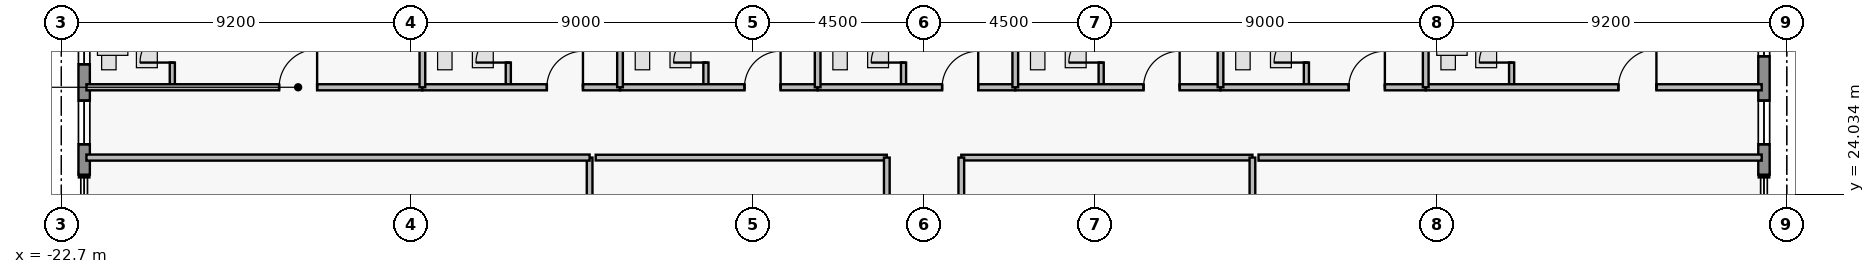
"""IFC4 building model, lengths in metres.
Left out: names, types, materials, properties, quantities, classifications, styles, units other than length and angle.
Written with IfcOpenShell. Run it as: python <this file> out.ifc"""

import sys

from ifc_helpers import new_model, si_unit, direction, frame, frame_2d, origin, place, context, subcontext, project, spatial, rectangle, extrude, element, fill, save


model = new_model("IFC4")
c1 = context("Model", 3, precision=1e-05, world=origin(), true_north=direction((0.0, 1.0)))
c2 = subcontext(c1, "Body", "Model", "MODEL_VIEW")
j1 = project(units=[si_unit("LENGTHUNIT", "METRE"), si_unit("PLANEANGLEUNIT", "RADIAN")], contexts=[c1])
p1 = place(None, origin())
s1 = spatial("IfcSite", under=j1, at=p1, CompositionType="ELEMENT")
p2 = place(p1, origin())
s2 = spatial("IfcBuilding", under=s1, at=p2, CompositionType="ELEMENT")
p3 = place(p2, frame((0.0, 0.0, 203.65)))
s3 = spatial("IfcBuildingStorey", under=s2, at=p3, CompositionType="ELEMENT", Elevation=203.65)
p4 = place(p3, frame((-22.1, 24.55, 0.0), z_axis=(0.0, 0.0, 1.0), x_axis=(0.0, 1.0, 0.0)))
e1 = element("IfcWall", 1, at=p4, inside=s3, PredefinedType="STANDARD", context=c2, shape_type="SweptSolid", body=[
    extrude(rectangle(XDim=5.65, YDim=0.3, at=frame_2d((2.825, 0.0))), origin(), (0.0, 0.0, 1.0), 3.53),
])
p5 = place(p4, frame((0.8, 0.0, 0.95)))
e2 = element("IfcOpeningElement", 2, at=p5, cuts=e1, PredefinedType="OPENING", context=c2, shape_type="SweptSolid", body=[
    extrude(rectangle(XDim=1.15, YDim=1.55, at=frame_2d((0.575, 0.775))), frame((0.0, 0.16, 0.0), z_axis=(0.0, -1.0, 0.0), x_axis=(1.0, 0.0, 0.0)), (0.0, 0.0, 1.0), 0.32),
])
p6 = place(p4, frame((2.905, 0.0, 0.95)))
e3 = element("IfcOpeningElement", 3, at=p6, cuts=e1, PredefinedType="OPENING", context=c2, shape_type="SweptSolid", body=[
    extrude(rectangle(XDim=1.15, YDim=1.55, at=frame_2d((0.575, 0.775))), frame((0.0, 0.16, 0.0), z_axis=(0.0, -1.0, 0.0), x_axis=(1.0, 0.0, 0.0)), (0.0, 0.0, 1.0), 0.32),
])
p7 = place(p3, frame((22.1, 30.2, 0.0), z_axis=(0.0, 0.0, 1.0), x_axis=(0.0, -1.0, 0.0)))
e4 = element("IfcWall", 4, at=p7, inside=s3, PredefinedType="STANDARD", context=c2, shape_type="SweptSolid", body=[
    extrude(rectangle(XDim=5.65, YDim=0.3, at=frame_2d((2.825, 0.0))), origin(), (0.0, 0.0, 1.0), 3.53),
])
p8 = place(p7, frame((0.935, 0.0, 0.85)))
e5 = element("IfcOpeningElement", 5, at=p8, cuts=e4, PredefinedType="OPENING", context=c2, shape_type="SweptSolid", body=[
    extrude(rectangle(XDim=1.6, YDim=1.8, at=frame_2d((0.8, 0.9))), frame((0.0, 0.16, 0.0), z_axis=(0.0, -1.0, 0.0), x_axis=(1.0, 0.0, 0.0)), (0.0, 0.0, 1.0), 0.32),
])
p9 = place(p7, frame((3.7, 0.0, 0.95)))
e6 = element("IfcOpeningElement", 6, at=p9, cuts=e4, PredefinedType="OPENING", context=c2, shape_type="SweptSolid", body=[
    extrude(rectangle(XDim=1.15, YDim=1.55, at=frame_2d((0.575, 0.775))), frame((0.0, 0.16, 0.0), z_axis=(0.0, -1.0, 0.0), x_axis=(1.0, 0.0, 0.0)), (0.0, 0.0, 1.0), 0.32),
])
p10 = place(p3, frame((-19.78, 26.85, 0.0), z_axis=(0.0, 0.0, 1.0), x_axis=(0.0, 1.0, 0.0)))
e7 = element("IfcWall", 7, at=p10, inside=s3, PredefinedType="PLUMBINGWALL", context=c2, shape_type="SweptSolid", body=[
    extrude(rectangle(XDim=2.36, YDim=0.135, at=frame_2d((1.18, 0.0))), origin(), (0.0, 0.0, 1.0), 3.53),
])
p11 = place(p10, frame((0.65, 0.0, 0.0)))
e8 = element("IfcOpeningElement", 8, at=p11, cuts=e7, PredefinedType="OPENING", context=c2, shape_type="SweptSolid", body=[
    extrude(rectangle(XDim=0.85, YDim=2.1, at=frame_2d((0.425, 1.05))), frame((0.0, 0.077, 0.0), z_axis=(0.0, -1.0, 0.0), x_axis=(1.0, 0.0, 0.0)), (0.0, 0.0, 1.0), 0.155),
])
p12 = place(p3, frame((-22.04, 26.85, 0.0), z_axis=(0.0, 0.0, 1.0), x_axis=(1.0, 0.0, 0.0)))
e9 = element("IfcWall", 9, at=p12, inside=s3, PredefinedType="PARTITIONING", context=c2, shape_type="SweptSolid", body=[
    extrude(rectangle(XDim=8.84, YDim=0.16, at=frame_2d((4.42, 0.0))), origin(), (0.0, 0.0, 1.0), 3.53),
])
p13 = place(p12, frame((5.07, 0.0, 0.0)))
e10 = element("IfcOpeningElement", 10, at=p13, cuts=e9, PredefinedType="OPENING", context=c2, shape_type="SweptSolid", body=[
    extrude(rectangle(XDim=1.0, YDim=2.15, at=frame_2d((0.5, 1.075))), frame((0.0, 0.09, 0.0), z_axis=(0.0, -1.0, 0.0), x_axis=(1.0, 0.0, 0.0)), (0.0, 0.0, 1.0), 0.18),
])
p14 = place(p3, frame((-10.94, 26.85, 0.0), z_axis=(0.0, 0.0, 1.0), x_axis=(0.0, 1.0, 0.0)))
e11 = element("IfcWall", 11, at=p14, inside=s3, PredefinedType="PLUMBINGWALL", context=c2, shape_type="SweptSolid", body=[
    extrude(rectangle(XDim=2.36, YDim=0.135, at=frame_2d((1.18, 0.0))), origin(), (0.0, 0.0, 1.0), 3.53),
])
p15 = place(p14, frame((0.65, 0.0, 0.0)))
e12 = element("IfcOpeningElement", 12, at=p15, cuts=e11, PredefinedType="OPENING", context=c2, shape_type="SweptSolid", body=[
    extrude(rectangle(XDim=0.85, YDim=2.1, at=frame_2d((0.425, 1.05))), frame((0.0, 0.077, 0.0), z_axis=(0.0, -1.0, 0.0), x_axis=(1.0, 0.0, 0.0)), (0.0, 0.0, 1.0), 0.155),
])
p16 = place(p3, frame((-13.2, 26.85, 0.0), z_axis=(0.0, 0.0, 1.0), x_axis=(1.0, 0.0, 0.0)))
e13 = element("IfcWall", 13, at=p16, inside=s3, PredefinedType="PARTITIONING", context=c2, shape_type="SweptSolid", body=[
    extrude(rectangle(XDim=5.2, YDim=0.16, at=frame_2d((2.6, 0.0))), origin(), (0.0, 0.0, 1.0), 3.53),
])
p17 = place(p16, frame((3.275, 0.0, 0.0)))
e14 = element("IfcOpeningElement", 14, at=p17, cuts=e13, PredefinedType="OPENING", context=c2, shape_type="SweptSolid", body=[
    extrude(rectangle(XDim=0.95, YDim=2.15, at=frame_2d((0.475, 1.075))), frame((0.0, 0.09, 0.0), z_axis=(0.0, -1.0, 0.0), x_axis=(1.0, 0.0, 0.0)), (0.0, 0.0, 1.0), 0.18),
])
p18 = place(p3, frame((-5.74, 26.85, 0.0), z_axis=(0.0, 0.0, 1.0), x_axis=(0.0, 1.0, 0.0)))
e15 = element("IfcWall", 15, at=p18, inside=s3, PredefinedType="PLUMBINGWALL", context=c2, shape_type="SweptSolid", body=[
    extrude(rectangle(XDim=2.36, YDim=0.135, at=frame_2d((1.18, 0.0))), origin(), (0.0, 0.0, 1.0), 3.53),
])
p19 = place(p18, frame((0.65, 0.0, 0.0)))
e16 = element("IfcOpeningElement", 16, at=p19, cuts=e15, PredefinedType="OPENING", context=c2, shape_type="SweptSolid", body=[
    extrude(rectangle(XDim=0.85, YDim=2.1, at=frame_2d((0.425, 1.05))), frame((0.0, 0.077, 0.0), z_axis=(0.0, -1.0, 0.0), x_axis=(1.0, 0.0, 0.0)), (0.0, 0.0, 1.0), 0.155),
])
p20 = place(p3, frame((-8.0, 26.85, 0.0), z_axis=(0.0, 0.0, 1.0), x_axis=(1.0, 0.0, 0.0)))
e17 = element("IfcWall", 17, at=p20, inside=s3, PredefinedType="PARTITIONING", context=c2, shape_type="SweptSolid", body=[
    extrude(rectangle(XDim=5.2, YDim=0.16, at=frame_2d((2.6, 0.0))), origin(), (0.0, 0.0, 1.0), 3.53),
])
p21 = place(p20, frame((3.275, 0.0, 0.0)))
e18 = element("IfcOpeningElement", 18, at=p21, cuts=e17, PredefinedType="OPENING", context=c2, shape_type="SweptSolid", body=[
    extrude(rectangle(XDim=0.95, YDim=2.15, at=frame_2d((0.475, 1.075))), frame((0.0, 0.09, 0.0), z_axis=(0.0, -1.0, 0.0), x_axis=(1.0, 0.0, 0.0)), (0.0, 0.0, 1.0), 0.18),
])
p22 = place(p3, frame((-0.54, 26.85, 0.0), z_axis=(0.0, 0.0, 1.0), x_axis=(0.0, 1.0, 0.0)))
e19 = element("IfcWall", 19, at=p22, inside=s3, PredefinedType="PLUMBINGWALL", context=c2, shape_type="SweptSolid", body=[
    extrude(rectangle(XDim=2.36, YDim=0.135, at=frame_2d((1.18, 0.0))), origin(), (0.0, 0.0, 1.0), 3.53),
])
p23 = place(p22, frame((0.65, 0.0, 0.0)))
e20 = element("IfcOpeningElement", 20, at=p23, cuts=e19, PredefinedType="OPENING", context=c2, shape_type="SweptSolid", body=[
    extrude(rectangle(XDim=0.85, YDim=2.1, at=frame_2d((0.425, 1.05))), frame((0.0, 0.077, 0.0), z_axis=(0.0, -1.0, 0.0), x_axis=(1.0, 0.0, 0.0)), (0.0, 0.0, 1.0), 0.155),
])
p24 = place(p3, frame((-2.8, 26.85, 0.0), z_axis=(0.0, 0.0, 1.0), x_axis=(1.0, 0.0, 0.0)))
e21 = element("IfcWall", 21, at=p24, inside=s3, PredefinedType="PARTITIONING", context=c2, shape_type="SweptSolid", body=[
    extrude(rectangle(XDim=5.2, YDim=0.16, at=frame_2d((2.6, 0.0))), origin(), (0.0, 0.0, 1.0), 3.53),
])
p25 = place(p24, frame((3.275, 0.0, 0.0)))
e22 = element("IfcOpeningElement", 22, at=p25, cuts=e21, PredefinedType="OPENING", context=c2, shape_type="SweptSolid", body=[
    extrude(rectangle(XDim=0.95, YDim=2.15, at=frame_2d((0.475, 1.075))), frame((0.0, 0.09, 0.0), z_axis=(0.0, -1.0, 0.0), x_axis=(1.0, 0.0, 0.0)), (0.0, 0.0, 1.0), 0.18),
])
p26 = place(p3, frame((4.66, 26.85, 0.0), z_axis=(0.0, 0.0, 1.0), x_axis=(0.0, 1.0, 0.0)))
e23 = element("IfcWall", 23, at=p26, inside=s3, PredefinedType="PLUMBINGWALL", context=c2, shape_type="SweptSolid", body=[
    extrude(rectangle(XDim=2.36, YDim=0.135, at=frame_2d((1.18, 0.0))), origin(), (0.0, 0.0, 1.0), 2.519),
])
p27 = place(p26, frame((0.65, 0.0, 0.0)))
e24 = element("IfcOpeningElement", 24, at=p27, cuts=e23, PredefinedType="OPENING", context=c2, shape_type="SweptSolid", body=[
    extrude(rectangle(XDim=0.85, YDim=2.1, at=frame_2d((0.425, 1.05))), frame((0.0, 0.077, 0.0), z_axis=(0.0, -1.0, 0.0), x_axis=(1.0, 0.0, 0.0)), (0.0, 0.0, 1.0), 0.155),
])
p28 = place(p3, frame((2.4, 26.85, 0.0), z_axis=(0.0, 0.0, 1.0), x_axis=(1.0, 0.0, 0.0)))
e25 = element("IfcWall", 25, at=p28, inside=s3, PredefinedType="PARTITIONING", context=c2, shape_type="SweptSolid", body=[
    extrude(rectangle(XDim=5.4, YDim=0.16, at=frame_2d((2.7, 0.0))), origin(), (0.0, 0.0, 1.0), 3.53),
])
p29 = place(p28, frame((3.375, 0.0, 0.0)))
e26 = element("IfcOpeningElement", 26, at=p29, cuts=e25, PredefinedType="OPENING", context=c2, shape_type="SweptSolid", body=[
    extrude(rectangle(XDim=0.95, YDim=2.15, at=frame_2d((0.475, 1.075))), frame((0.0, 0.09, 0.0), z_axis=(0.0, -1.0, 0.0), x_axis=(1.0, 0.0, 0.0)), (0.0, 0.0, 1.0), 0.18),
])
p30 = place(p3, frame((10.06, 26.85, 0.0), z_axis=(0.0, 0.0, 1.0), x_axis=(0.0, 1.0, 0.0)))
e27 = element("IfcWall", 27, at=p30, inside=s3, PredefinedType="PLUMBINGWALL", context=c2, shape_type="SweptSolid", body=[
    extrude(rectangle(XDim=2.36, YDim=0.135, at=frame_2d((1.18, 0.0))), origin(), (0.0, 0.0, 1.0), 3.53),
])
p31 = place(p30, frame((0.65, 0.0, 0.0)))
e28 = element("IfcOpeningElement", 28, at=p31, cuts=e27, PredefinedType="OPENING", context=c2, shape_type="SweptSolid", body=[
    extrude(rectangle(XDim=0.85, YDim=2.1, at=frame_2d((0.425, 1.05))), frame((0.0, 0.077, 0.0), z_axis=(0.0, -1.0, 0.0), x_axis=(1.0, 0.0, 0.0)), (0.0, 0.0, 1.0), 0.155),
])
p32 = place(p3, frame((7.8, 26.85, 0.0), z_axis=(0.0, 0.0, 1.0), x_axis=(1.0, 0.0, 0.0)))
e29 = element("IfcWall", 29, at=p32, inside=s3, PredefinedType="PARTITIONING", context=c2, shape_type="SweptSolid", body=[
    extrude(rectangle(XDim=5.4, YDim=0.16, at=frame_2d((2.7, 0.0))), origin(), (0.0, 0.0, 1.0), 3.53),
])
p33 = place(p32, frame((3.375, 0.0, 0.0)))
e30 = element("IfcOpeningElement", 30, at=p33, cuts=e29, PredefinedType="OPENING", context=c2, shape_type="SweptSolid", body=[
    extrude(rectangle(XDim=0.95, YDim=2.15, at=frame_2d((0.475, 1.075))), frame((0.0, 0.09, 0.0), z_axis=(0.0, -1.0, 0.0), x_axis=(1.0, 0.0, 0.0)), (0.0, 0.0, 1.0), 0.18),
])
p34 = place(p3, frame((15.46, 26.85, 0.0), z_axis=(0.0, 0.0, 1.0), x_axis=(0.0, 1.0, 0.0)))
e31 = element("IfcWall", 31, at=p34, inside=s3, PredefinedType="PLUMBINGWALL", context=c2, shape_type="SweptSolid", body=[
    extrude(rectangle(XDim=2.36, YDim=0.135, at=frame_2d((1.18, 0.0))), origin(), (0.0, 0.0, 1.0), 3.53),
])
p35 = place(p34, frame((0.65, 0.0, 0.0)))
e32 = element("IfcOpeningElement", 32, at=p35, cuts=e31, PredefinedType="OPENING", context=c2, shape_type="SweptSolid", body=[
    extrude(rectangle(XDim=0.85, YDim=2.1, at=frame_2d((0.425, 1.05))), frame((0.0, 0.077, 0.0), z_axis=(0.0, -1.0, 0.0), x_axis=(1.0, 0.0, 0.0)), (0.0, 0.0, 1.0), 0.155),
])
p36 = place(p3, frame((13.2, 26.85, 0.0), z_axis=(0.0, 0.0, 1.0), x_axis=(1.0, 0.0, 0.0)))
e33 = element("IfcWall", 33, at=p36, inside=s3, PredefinedType="PARTITIONING", context=c2, shape_type="SweptSolid", body=[
    extrude(rectangle(XDim=8.84, YDim=0.16, at=frame_2d((4.42, 0.0))), origin(), (0.0, 0.0, 1.0), 3.53),
])
p37 = place(p36, frame((5.07, 0.0, 0.0)))
e34 = element("IfcOpeningElement", 34, at=p37, cuts=e33, PredefinedType="OPENING", context=c2, shape_type="SweptSolid", body=[
    extrude(rectangle(XDim=1.0, YDim=2.15, at=frame_2d((0.5, 1.075))), frame((0.0, 0.09, 0.0), z_axis=(0.0, -1.0, 0.0), x_axis=(1.0, 0.0, 0.0)), (0.0, 0.0, 1.0), 0.18),
])
for number, where, z_axis, x_axis in (
    (35, (-13.2, 26.85, 0.0), (0.0, 0.0, 1.0), (0.0, 1.0, 0.0)),
    (36, (-8.0, 26.85, 0.0), (0.0, 0.0, 1.0), (0.0, 1.0, 0.0)),
    (37, (-2.8, 26.85, 0.0), (0.0, 0.0, 1.0), (0.0, 1.0, 0.0)),
    (38, (2.4, 26.85, 0.0), (0.0, 0.0, 1.0), (0.0, 1.0, 0.0)),
    (39, (7.8, 26.85, 0.0), (0.0, 0.0, 1.0), (0.0, 1.0, 0.0)),
    (40, (13.2, 26.85, 0.0), (0.0, 0.0, 1.0), (0.0, 1.0, 0.0)),
):
    element("IfcWall", number, at=place(p3, frame(where, z_axis=z_axis, x_axis=x_axis)), inside=s3, PredefinedType="PARTITIONING", context=c2, shape_type="SweptSolid", body=[
        extrude(rectangle(XDim=6.67, YDim=0.15, at=frame_2d((3.335, 0.0))), origin(), (0.0, 0.0, 1.0), 3.53),
    ])
p38 = place(p3, frame((-8.8, 16.7, 0.0), z_axis=(0.0, 0.0, 1.0), x_axis=(0.0, 1.0, 0.0)))
e41 = element("IfcWall", 41, at=p38, inside=s3, PredefinedType="PARTITIONING", context=c2, shape_type="SweptSolid", body=[
    extrude(rectangle(XDim=8.3, YDim=0.15, at=frame_2d((4.15, 0.0))), origin(), (0.0, 0.0, 1.0), 3.53),
])
p39 = place(p3, frame((-22.04, 25.0, 0.0), z_axis=(0.0, 0.0, 1.0), x_axis=(1.0, 0.0, 0.0)))
e42 = element("IfcWall", 42, at=p39, inside=s3, PredefinedType="PARTITIONING", context=c2, shape_type="SweptSolid", body=[
    extrude(rectangle(XDim=13.24, YDim=0.16, at=frame_2d((6.62, 0.0))), origin(), (0.0, 0.0, 1.0), 3.124),
])
p40 = place(p3, frame((-8.64, 25.0, 0.0), z_axis=(0.0, 0.0, 1.0), x_axis=(1.0, 0.0, 0.0)))
e43 = element("IfcWall", 43, at=p40, inside=s3, PredefinedType="PARTITIONING", context=c2, shape_type="SweptSolid", body=[
    extrude(rectangle(XDim=7.66, YDim=0.15, at=frame_2d((3.83, 0.0))), origin(), (0.0, 0.0, 1.0), 3.124),
])
p41 = place(p3, frame((-0.98, 16.7, 0.0), z_axis=(0.0, 0.0, 1.0), x_axis=(0.0, 1.0, 0.0)))
e44 = element("IfcWall", 44, at=p41, inside=s3, PredefinedType="PARTITIONING", context=c2, shape_type="SweptSolid", body=[
    extrude(rectangle(XDim=8.3, YDim=0.15, at=frame_2d((4.15, 0.0))), origin(), (0.0, 0.0, 1.0), 3.53),
])
p42 = place(p3, frame((0.98, 25.0, 0.0), z_axis=(0.0, 0.0, 1.0), x_axis=(1.0, 0.0, 0.0)))
e45 = element("IfcWall", 45, at=p42, inside=s3, PredefinedType="PARTITIONING", context=c2, shape_type="SweptSolid", body=[
    extrude(rectangle(XDim=7.66, YDim=0.15, at=frame_2d((3.83, 0.0))), origin(), (0.0, 0.0, 1.0), 3.124),
])
for number, where, z_axis, x_axis in (
    (46, (0.98, 16.7, 0.0), (0.0, 0.0, 1.0), (0.0, 1.0, 0.0)),
    (47, (8.64, 16.7, 0.0), (0.0, 0.0, 1.0), (0.0, 1.0, 0.0)),
):
    element("IfcWall", number, at=place(p3, frame(where, z_axis=z_axis, x_axis=x_axis)), inside=s3, PredefinedType="PARTITIONING", context=c2, shape_type="SweptSolid", body=[
        extrude(rectangle(XDim=8.3, YDim=0.15, at=frame_2d((4.15, 0.0))), origin(), (0.0, 0.0, 1.0), 3.53),
    ])
p43 = place(p3, frame((8.8, 25.0, 0.0), z_axis=(0.0, 0.0, 1.0), x_axis=(1.0, 0.0, 0.0)))
e48 = element("IfcWall", 48, at=p43, inside=s3, PredefinedType="PARTITIONING", context=c2, shape_type="SweptSolid", body=[
    extrude(rectangle(XDim=13.24, YDim=0.16, at=frame_2d((6.62, 0.0))), origin(), (0.0, 0.0, 1.0), 3.124),
])
p44 = place(p5, origin())
e49 = element("IfcWindow", 49, at=p44, inside=s3, PartitioningType="SINGLE_PANEL", PredefinedType="WINDOW", context=c2, shape_type="SweptSolid", body=[
    extrude(rectangle(XDim=1.15, YDim=1.55, at=frame_2d((0.575, 0.775))), frame((0.0, 0.03, 0.0), z_axis=(0.0, -1.0, 0.0), x_axis=(1.0, 0.0, 0.0)), (0.0, 0.0, 1.0), 0.06),
])
fill(e2, e49)
p45 = place(p6, origin())
e50 = element("IfcWindow", 50, at=p45, inside=s3, PartitioningType="SINGLE_PANEL", PredefinedType="WINDOW", context=c2, shape_type="SweptSolid", body=[
    extrude(rectangle(XDim=1.15, YDim=1.55, at=frame_2d((0.575, 0.775))), frame((0.0, 0.03, 0.0), z_axis=(0.0, -1.0, 0.0), x_axis=(1.0, 0.0, 0.0)), (0.0, 0.0, 1.0), 0.06),
])
fill(e3, e50)
p46 = place(p8, origin())
e51 = element("IfcWindow", 51, at=p46, inside=s3, PartitioningType="SINGLE_PANEL", PredefinedType="WINDOW", context=c2, shape_type="SweptSolid", body=[
    extrude(rectangle(XDim=1.6, YDim=1.8, at=frame_2d((0.8, 0.9))), frame((0.0, 0.03, 0.0), z_axis=(0.0, -1.0, 0.0), x_axis=(1.0, 0.0, 0.0)), (0.0, 0.0, 1.0), 0.06),
])
fill(e5, e51)
p47 = place(p9, origin())
e52 = element("IfcWindow", 52, at=p47, inside=s3, PartitioningType="SINGLE_PANEL", PredefinedType="WINDOW", context=c2, shape_type="SweptSolid", body=[
    extrude(rectangle(XDim=1.15, YDim=1.55, at=frame_2d((0.575, 0.775))), frame((0.0, 0.03, 0.0), z_axis=(0.0, -1.0, 0.0), x_axis=(1.0, 0.0, 0.0)), (0.0, 0.0, 1.0), 0.06),
])
fill(e6, e52)
p48 = place(p11, origin())
e53 = element("IfcDoor", 53, at=p48, inside=s3, OperationType="SINGLE_SWING_LEFT", PredefinedType="DOOR", context=c2, shape_type="SweptSolid", body=[
    extrude(rectangle(XDim=0.85, YDim=2.1, at=frame_2d((0.425, 1.05))), frame((0.0, 0.025, 0.0), z_axis=(0.0, -1.0, 0.0), x_axis=(1.0, 0.0, 0.0)), (0.0, 0.0, 1.0), 0.05),
])
fill(e8, e53)
p49 = place(p13, origin())
e54 = element("IfcDoor", 54, at=p49, inside=s3, OperationType="SINGLE_SWING_RIGHT", PredefinedType="DOOR", context=c2, shape_type="SweptSolid", body=[
    extrude(rectangle(XDim=1.0, YDim=2.15, at=frame_2d((0.5, 1.075))), frame((0.0, 0.025, 0.0), z_axis=(0.0, -1.0, 0.0), x_axis=(1.0, 0.0, 0.0)), (0.0, 0.0, 1.0), 0.05),
])
fill(e10, e54)
p50 = place(p15, origin())
e55 = element("IfcDoor", 55, at=p50, inside=s3, OperationType="SINGLE_SWING_LEFT", PredefinedType="DOOR", context=c2, shape_type="SweptSolid", body=[
    extrude(rectangle(XDim=0.85, YDim=2.1, at=frame_2d((0.425, 1.05))), frame((0.0, 0.025, 0.0), z_axis=(0.0, -1.0, 0.0), x_axis=(1.0, 0.0, 0.0)), (0.0, 0.0, 1.0), 0.05),
])
fill(e12, e55)
p51 = place(p17, origin())
e56 = element("IfcDoor", 56, at=p51, inside=s3, OperationType="SINGLE_SWING_RIGHT", PredefinedType="DOOR", context=c2, shape_type="SweptSolid", body=[
    extrude(rectangle(XDim=0.95, YDim=2.15, at=frame_2d((0.475, 1.075))), frame((0.0, 0.025, 0.0), z_axis=(0.0, -1.0, 0.0), x_axis=(1.0, 0.0, 0.0)), (0.0, 0.0, 1.0), 0.05),
])
fill(e14, e56)
p52 = place(p19, origin())
e57 = element("IfcDoor", 57, at=p52, inside=s3, OperationType="SINGLE_SWING_LEFT", PredefinedType="DOOR", context=c2, shape_type="SweptSolid", body=[
    extrude(rectangle(XDim=0.85, YDim=2.1, at=frame_2d((0.425, 1.05))), frame((0.0, 0.025, 0.0), z_axis=(0.0, -1.0, 0.0), x_axis=(1.0, 0.0, 0.0)), (0.0, 0.0, 1.0), 0.05),
])
fill(e16, e57)
p53 = place(p21, origin())
e58 = element("IfcDoor", 58, at=p53, inside=s3, OperationType="SINGLE_SWING_RIGHT", PredefinedType="DOOR", context=c2, shape_type="SweptSolid", body=[
    extrude(rectangle(XDim=0.95, YDim=2.15, at=frame_2d((0.475, 1.075))), frame((0.0, 0.025, 0.0), z_axis=(0.0, -1.0, 0.0), x_axis=(1.0, 0.0, 0.0)), (0.0, 0.0, 1.0), 0.05),
])
fill(e18, e58)
p54 = place(p23, origin())
e59 = element("IfcDoor", 59, at=p54, inside=s3, OperationType="SINGLE_SWING_LEFT", PredefinedType="DOOR", context=c2, shape_type="SweptSolid", body=[
    extrude(rectangle(XDim=0.85, YDim=2.1, at=frame_2d((0.425, 1.05))), frame((0.0, 0.025, 0.0), z_axis=(0.0, -1.0, 0.0), x_axis=(1.0, 0.0, 0.0)), (0.0, 0.0, 1.0), 0.05),
])
fill(e20, e59)
p55 = place(p25, origin())
e60 = element("IfcDoor", 60, at=p55, inside=s3, OperationType="SINGLE_SWING_RIGHT", PredefinedType="DOOR", context=c2, shape_type="SweptSolid", body=[
    extrude(rectangle(XDim=0.95, YDim=2.15, at=frame_2d((0.475, 1.075))), frame((0.0, 0.025, 0.0), z_axis=(0.0, -1.0, 0.0), x_axis=(1.0, 0.0, 0.0)), (0.0, 0.0, 1.0), 0.05),
])
fill(e22, e60)
p56 = place(p27, origin())
e61 = element("IfcDoor", 61, at=p56, inside=s3, OperationType="SINGLE_SWING_LEFT", PredefinedType="DOOR", context=c2, shape_type="SweptSolid", body=[
    extrude(rectangle(XDim=0.85, YDim=2.1, at=frame_2d((0.425, 1.05))), frame((0.0, 0.025, 0.0), z_axis=(0.0, -1.0, 0.0), x_axis=(1.0, 0.0, 0.0)), (0.0, 0.0, 1.0), 0.05),
])
fill(e24, e61)
p57 = place(p29, origin())
e62 = element("IfcDoor", 62, at=p57, inside=s3, OperationType="SINGLE_SWING_RIGHT", PredefinedType="DOOR", context=c2, shape_type="SweptSolid", body=[
    extrude(rectangle(XDim=0.95, YDim=2.15, at=frame_2d((0.475, 1.075))), frame((0.0, 0.025, 0.0), z_axis=(0.0, -1.0, 0.0), x_axis=(1.0, 0.0, 0.0)), (0.0, 0.0, 1.0), 0.05),
])
fill(e26, e62)
p58 = place(p31, origin())
e63 = element("IfcDoor", 63, at=p58, inside=s3, OperationType="SINGLE_SWING_LEFT", PredefinedType="DOOR", context=c2, shape_type="SweptSolid", body=[
    extrude(rectangle(XDim=0.85, YDim=2.1, at=frame_2d((0.425, 1.05))), frame((0.0, 0.025, 0.0), z_axis=(0.0, -1.0, 0.0), x_axis=(1.0, 0.0, 0.0)), (0.0, 0.0, 1.0), 0.05),
])
fill(e28, e63)
p59 = place(p33, origin())
e64 = element("IfcDoor", 64, at=p59, inside=s3, OperationType="SINGLE_SWING_RIGHT", PredefinedType="DOOR", context=c2, shape_type="SweptSolid", body=[
    extrude(rectangle(XDim=0.95, YDim=2.15, at=frame_2d((0.475, 1.075))), frame((0.0, 0.025, 0.0), z_axis=(0.0, -1.0, 0.0), x_axis=(1.0, 0.0, 0.0)), (0.0, 0.0, 1.0), 0.05),
])
fill(e30, e64)
p60 = place(p35, origin())
e65 = element("IfcDoor", 65, at=p60, inside=s3, OperationType="SINGLE_SWING_LEFT", PredefinedType="DOOR", context=c2, shape_type="SweptSolid", body=[
    extrude(rectangle(XDim=0.85, YDim=2.1, at=frame_2d((0.425, 1.05))), frame((0.0, 0.025, 0.0), z_axis=(0.0, -1.0, 0.0), x_axis=(1.0, 0.0, 0.0)), (0.0, 0.0, 1.0), 0.05),
])
fill(e32, e65)
p61 = place(p37, origin())
e66 = element("IfcDoor", 66, at=p61, inside=s3, OperationType="SINGLE_SWING_RIGHT", PredefinedType="DOOR", context=c2, shape_type="SweptSolid", body=[
    extrude(rectangle(XDim=1.0, YDim=2.15, at=frame_2d((0.5, 1.075))), frame((0.0, 0.025, 0.0), z_axis=(0.0, -1.0, 0.0), x_axis=(1.0, 0.0, 0.0)), (0.0, 0.0, 1.0), 0.05),
])
fill(e34, e66)
save(model, sys.argv[1])
